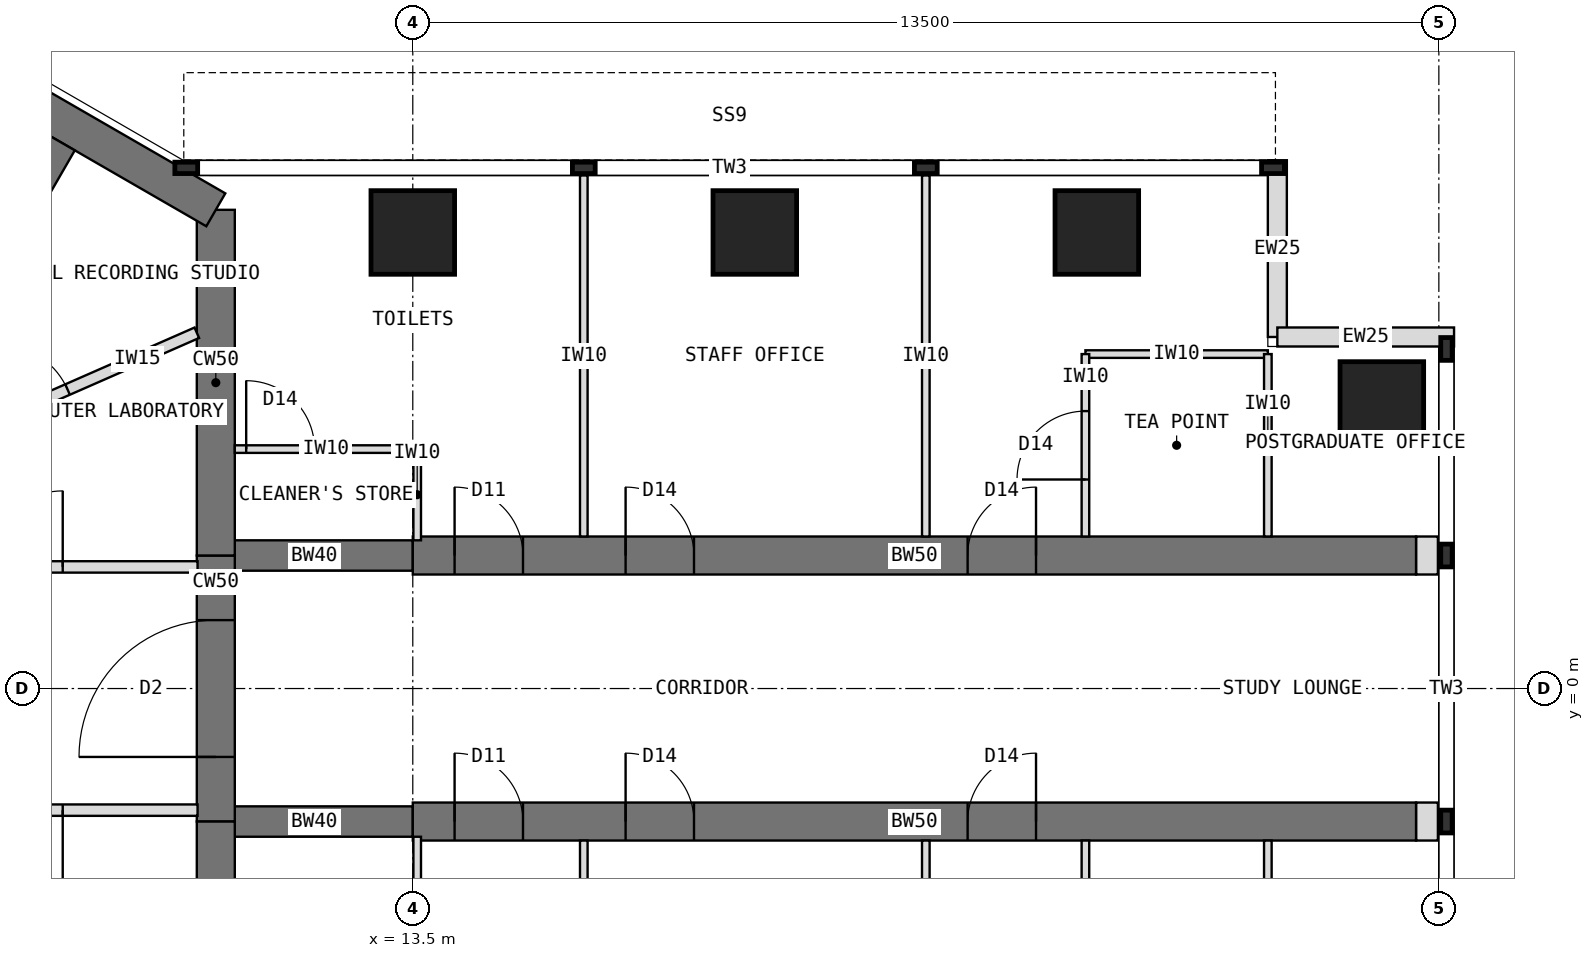
"""IFC4 building model, lengths in metres.
Left out: names, types, materials, properties, quantities, classifications, styles, units other than length and angle.
Written with IfcOpenShell. Run it as: python <this file> out.ifc"""

import sys

from ifc_helpers import new_model, si_unit, direction, frame, frame_2d, origin, origin_2d, place, context, subcontext, project, spatial, rectangle, extrude, element, fill, save


model = new_model("IFC4")
c1 = context("Model", 3, precision=1e-05, world=origin(), true_north=direction((0.0, 1.0)))
c2 = subcontext(c1, "Body", "Model", "MODEL_VIEW")
j1 = project(units=[si_unit("LENGTHUNIT", "METRE"), si_unit("PLANEANGLEUNIT", "RADIAN")], contexts=[c1])
p1 = place(None, origin())
s1 = spatial("IfcSite", under=j1, at=p1, CompositionType="ELEMENT")
p2 = place(p1, origin())
s2 = spatial("IfcBuilding", under=s1, at=p2, CompositionType="ELEMENT")
p3 = place(p2, frame((0.0, 0.0, 218.5)))
s3 = spatial("IfcBuildingStorey", under=s2, at=p3, CompositionType="ELEMENT", Elevation=218.5)
p4 = place(p3, frame((10.908, -6.298, 0.0), z_axis=(0.0, 0.0, 1.0), x_axis=(0.0, 1.0, 0.0)))
e1 = element("IfcWall", 1, at=p4, inside=s3, PredefinedType="SHEAR", context=c2, shape_type="SweptSolid", body=[
    extrude(rectangle(XDim=4.548, YDim=0.5, at=frame_2d((2.274, 0.0))), origin(), (0.0, 0.0, 1.0), 4.0),
])
p5 = place(p3, frame((10.908, -1.75, 0.0), z_axis=(0.0, 0.0, 1.0), x_axis=(0.0, 1.0, 0.0)))
e2 = element("IfcWall", 2, at=p5, inside=s3, PredefinedType="SHEAR", context=c2, shape_type="SweptSolid", body=[
    extrude(rectangle(XDim=3.5, YDim=0.5, at=frame_2d((1.75, 0.0))), origin(), (0.0, 0.0, 1.0), 4.0),
])
p6 = place(p5, frame((0.85, 0.0, 0.0)))
e3 = element("IfcOpeningElement", 3, at=p6, cuts=e2, PredefinedType="OPENING", context=c2, shape_type="SweptSolid", body=[
    extrude(rectangle(XDim=1.8, YDim=2.1, at=frame_2d((0.9, 1.05))), frame((0.0, 0.26, 0.0), z_axis=(0.0, -1.0, 0.0), x_axis=(1.0, 0.0, 0.0)), (0.0, 0.0, 1.0), 0.52),
])
p7 = place(p3, frame((10.908, 1.75, 0.0), z_axis=(0.0, 0.0, 1.0), x_axis=(0.0, 1.0, 0.0)))
e4 = element("IfcWall", 4, at=p7, inside=s3, PredefinedType="SHEAR", context=c2, shape_type="SweptSolid", body=[
    extrude(rectangle(XDim=4.548, YDim=0.5, at=frame_2d((2.274, 0.0))), origin(), (0.0, 0.0, 1.0), 4.0),
])
p8 = place(p3, frame((10.908, 6.298, 0.0), z_axis=(0.0, 0.0, 1.0), x_axis=(-0.866021940709, 0.500005998175, 0.0)))
e5 = element("IfcWall", 5, at=p8, inside=s3, PredefinedType="SHEAR", context=c2, shape_type="SweptSolid", body=[
    extrude(rectangle(XDim=12.596, YDim=0.5, at=frame_2d((6.298, 0.0))), origin(), (0.0, 0.0, 1.0), 4.0),
])
p9 = place(p3, frame((10.908, 1.75, 0.0), z_axis=(0.0, 0.0, 1.0), x_axis=(1.0, 0.0, 0.0)))
e6 = element("IfcWall", 6, at=p9, inside=s3, PredefinedType="SHEAR", context=c2, shape_type="SweptSolid", body=[
    extrude(rectangle(XDim=2.592, YDim=0.4, at=frame_2d((1.296, 0.0))), origin(), (0.0, 0.0, 1.0), 4.0),
])
p10 = place(p3, frame((13.5, 1.75, 0.0), z_axis=(0.0, 0.0, 1.0), x_axis=(1.0, 0.0, 0.0)))
e7 = element("IfcWall", 7, at=p10, inside=s3, PredefinedType="SHEAR", context=c2, shape_type="SweptSolid", body=[
    extrude(rectangle(XDim=13.2, YDim=0.5, at=frame_2d((6.6, 0.0))), origin(), (0.0, 0.0, 1.0), 4.0),
])
p11 = place(p10, frame((0.55, 0.0, 0.0)))
e8 = element("IfcOpeningElement", 8, at=p11, cuts=e7, PredefinedType="OPENING", context=c2, shape_type="SweptSolid", body=[
    extrude(rectangle(XDim=0.9, YDim=2.1, at=frame_2d((0.45, 1.05))), frame((0.0, 0.26, 0.0), z_axis=(0.0, -1.0, 0.0), x_axis=(1.0, 0.0, 0.0)), (0.0, 0.0, 1.0), 0.52),
])
p12 = place(p10, frame((2.8, 0.0, 0.0)))
e9 = element("IfcOpeningElement", 9, at=p12, cuts=e7, PredefinedType="OPENING", context=c2, shape_type="SweptSolid", body=[
    extrude(rectangle(XDim=0.9, YDim=2.1, at=frame_2d((0.45, 1.05))), frame((0.0, 0.26, 0.0), z_axis=(0.0, -1.0, 0.0), x_axis=(1.0, 0.0, 0.0)), (0.0, 0.0, 1.0), 0.52),
])
p13 = place(p10, frame((7.3, 0.0, 0.0)))
e10 = element("IfcOpeningElement", 10, at=p13, cuts=e7, PredefinedType="OPENING", context=c2, shape_type="SweptSolid", body=[
    extrude(rectangle(XDim=0.9, YDim=2.1, at=frame_2d((0.45, 1.05))), frame((0.0, 0.26, 0.0), z_axis=(0.0, -1.0, 0.0), x_axis=(1.0, 0.0, 0.0)), (0.0, 0.0, 1.0), 0.52),
])
p14 = place(p3, frame((10.908, -1.75, 0.0), z_axis=(0.0, 0.0, 1.0), x_axis=(1.0, 0.0, 0.0)))
e11 = element("IfcWall", 11, at=p14, inside=s3, PredefinedType="SHEAR", context=c2, shape_type="SweptSolid", body=[
    extrude(rectangle(XDim=2.592, YDim=0.4, at=frame_2d((1.296, 0.0))), origin(), (0.0, 0.0, 1.0), 4.0),
])
p15 = place(p3, frame((13.5, -1.75, 0.0), z_axis=(0.0, 0.0, 1.0), x_axis=(1.0, 0.0, 0.0)))
e12 = element("IfcWall", 12, at=p15, inside=s3, PredefinedType="SHEAR", context=c2, shape_type="SweptSolid", body=[
    extrude(rectangle(XDim=13.2, YDim=0.5, at=frame_2d((6.6, 0.0))), origin(), (0.0, 0.0, 1.0), 4.0),
])
p16 = place(p15, frame((0.55, 0.0, 0.0)))
e13 = element("IfcOpeningElement", 13, at=p16, cuts=e12, PredefinedType="OPENING", context=c2, shape_type="SweptSolid", body=[
    extrude(rectangle(XDim=0.9, YDim=2.1, at=frame_2d((0.45, 1.05))), frame((0.0, 0.26, 0.0), z_axis=(0.0, -1.0, 0.0), x_axis=(1.0, 0.0, 0.0)), (0.0, 0.0, 1.0), 0.52),
])
p17 = place(p15, frame((2.8, 0.0, 0.0)))
e14 = element("IfcOpeningElement", 14, at=p17, cuts=e12, PredefinedType="OPENING", context=c2, shape_type="SweptSolid", body=[
    extrude(rectangle(XDim=0.9, YDim=2.1, at=frame_2d((0.45, 1.05))), frame((0.0, 0.26, 0.0), z_axis=(0.0, -1.0, 0.0), x_axis=(1.0, 0.0, 0.0)), (0.0, 0.0, 1.0), 0.52),
])
p18 = place(p15, frame((7.3, 0.0, 0.0)))
e15 = element("IfcOpeningElement", 15, at=p18, cuts=e12, PredefinedType="OPENING", context=c2, shape_type="SweptSolid", body=[
    extrude(rectangle(XDim=0.9, YDim=2.1, at=frame_2d((0.45, 1.05))), frame((0.0, 0.26, 0.0), z_axis=(0.0, -1.0, 0.0), x_axis=(1.0, 0.0, 0.0)), (0.0, 0.0, 1.0), 0.52),
])
for number, where, z_axis, x_axis in (
    (16, (13.5, 6.0, 0.0), (0.0, 0.0, 1.0), (1.0, 0.0, 0.0)),
    (17, (18.0, 6.0, 0.0), (0.0, 0.0, 1.0), (1.0, 0.0, 0.0)),
    (18, (22.5, 6.0, 0.0), (0.0, 0.0, 1.0), (1.0, 0.0, 0.0)),
    (19, (26.25, 3.75, 0.0), (0.0, 0.0, 1.0), (1.0, 0.0, 0.0)),
):
    element("IfcColumn", number, at=place(p3, frame(where, z_axis=z_axis, x_axis=x_axis)), inside=s3, PredefinedType="COLUMN", context=c2, shape_type="SweptSolid", body=[
        extrude(rectangle(XDim=1.1, YDim=1.1, at=origin_2d()), origin(), (0.0, 0.0, 1.0), 4.0),
    ])
for number, where, z_axis, x_axis in (
    (20, (24.875, 6.95, 0.0), (0.0, 0.0, 1.0), (0.0, -1.0, 0.0)),
    (21, (24.875, 4.625, 0.0), (0.0, 0.0, 1.0), (1.0, 0.0, 0.0)),
):
    element("IfcWall", number, at=place(p3, frame(where, z_axis=z_axis, x_axis=x_axis)), inside=s3, PredefinedType="STANDARD", context=c2, shape_type="SweptSolid", body=[
        extrude(rectangle(XDim=2.325, YDim=0.25, at=frame_2d((1.163, 0.0))), origin(), (0.0, 0.0, 1.0), 3.8),
    ])
for number, where, z_axis, x_axis in (
    (22, (26.7, 1.75, 0.0), (0.0, 0.0, 1.0), (1.0, 0.0, 0.0)),
    (23, (26.7, -1.75, 0.0), (0.0, 0.0, 1.0), (1.0, 0.0, 0.0)),
):
    element("IfcWall", number, at=place(p3, frame(where, z_axis=z_axis, x_axis=x_axis)), inside=s3, PredefinedType="PARTITIONING", context=c2, shape_type="SweptSolid", body=[
        extrude(rectangle(XDim=0.288, YDim=0.5, at=frame_2d((0.144, 0.0))), origin(), (0.0, 0.0, 1.0), 3.8),
    ])
for number, where, z_axis, x_axis in (
    (24, (5.901, 2.02, 0.0), (0.0, 0.0, 1.0), (0.5, 0.866, 0.0)),
    (25, (5.901, -2.02, 0.0), (0.0, 0.0, 1.0), (0.5, -0.866, 0.0)),
):
    element("IfcWall", number, at=place(p3, frame(where, z_axis=z_axis, x_axis=x_axis)), inside=s3, PredefinedType="SHEAR", context=c2, shape_type="SweptSolid", body=[
        extrude(rectangle(XDim=5.958, YDim=0.4, at=frame_2d((2.979, 0.0))), origin(), (0.0, 0.0, 1.0), 4.0),
    ])
for number, where, z_axis, x_axis in (
    (26, (15.75, 2.0, 0.0), (0.0, 0.0, 1.0), (0.0, 1.0, 0.0)),
    (27, (20.25, 2.0, 0.0), (0.0, 0.0, 1.0), (0.0, 1.0, 0.0)),
):
    element("IfcWall", number, at=place(p3, frame(where, z_axis=z_axis, x_axis=x_axis)), inside=s3, PredefinedType="PARTITIONING", context=c2, shape_type="SweptSolid", body=[
        extrude(rectangle(XDim=4.75, YDim=0.1, at=frame_2d((2.375, 0.0))), origin(), (0.0, 0.0, 1.0), 3.8),
    ])
p19 = place(p3, frame((22.35, 4.4, 0.0), z_axis=(0.0, 0.0, 1.0), x_axis=(1.0, 0.0, 0.0)))
e28 = element("IfcWall", 28, at=p19, inside=s3, PredefinedType="PARTITIONING", context=c2, shape_type="SweptSolid", body=[
    extrude(rectangle(XDim=2.4, YDim=0.1, at=frame_2d((1.2, 0.0))), origin(), (0.0, 0.0, 1.0), 3.8),
])
p20 = place(p3, frame((22.35, 2.0, 0.0), z_axis=(0.0, 0.0, 1.0), x_axis=(0.0, 1.0, 0.0)))
e29 = element("IfcWall", 29, at=p20, inside=s3, PredefinedType="PARTITIONING", context=c2, shape_type="SweptSolid", body=[
    extrude(rectangle(XDim=2.4, YDim=0.1, at=frame_2d((1.2, 0.0))), origin(), (0.0, 0.0, 1.0), 3.8),
])
p21 = place(p20, frame((0.75, 0.0, 0.0)))
e30 = element("IfcOpeningElement", 30, at=p21, cuts=e29, PredefinedType="OPENING", context=c2, shape_type="SweptSolid", body=[
    extrude(rectangle(XDim=0.9, YDim=2.1, at=frame_2d((0.45, 1.05))), frame((0.0, 0.06, 0.0), z_axis=(0.0, -1.0, 0.0), x_axis=(1.0, 0.0, 0.0)), (0.0, 0.0, 1.0), 0.12),
])
p22 = place(p3, frame((24.75, 2.0, 0.0), z_axis=(0.0, 0.0, 1.0), x_axis=(0.0, 1.0, 0.0)))
e31 = element("IfcWall", 31, at=p22, inside=s3, PredefinedType="PARTITIONING", context=c2, shape_type="SweptSolid", body=[
    extrude(rectangle(XDim=2.4, YDim=0.1, at=frame_2d((1.2, 0.0))), origin(), (0.0, 0.0, 1.0), 3.8),
])
p23 = place(p3, frame((11.158, 3.15, 0.0), z_axis=(0.0, 0.0, 1.0), x_axis=(1.0, 0.0, 0.0)))
e32 = element("IfcWall", 32, at=p23, inside=s3, PredefinedType="PARTITIONING", context=c2, shape_type="SweptSolid", body=[
    extrude(rectangle(XDim=2.4, YDim=0.1, at=frame_2d((1.2, 0.0))), origin(), (0.0, 0.0, 1.0), 3.8),
])
p24 = place(p23, frame((0.15, 0.0, 0.0)))
e33 = element("IfcOpeningElement", 33, at=p24, cuts=e32, PredefinedType="OPENING", context=c2, shape_type="SweptSolid", body=[
    extrude(rectangle(XDim=0.9, YDim=2.1, at=frame_2d((0.45, 1.05))), frame((0.0, 0.06, 0.0), z_axis=(0.0, -1.0, 0.0), x_axis=(1.0, 0.0, 0.0)), (0.0, 0.0, 1.0), 0.12),
])
p25 = place(p3, frame((13.558, 1.95, 0.0), z_axis=(0.0, 0.0, 1.0), x_axis=(0.0, 1.0, 0.0)))
e34 = element("IfcWall", 34, at=p25, inside=s3, PredefinedType="PARTITIONING", context=c2, shape_type="SweptSolid", body=[
    extrude(rectangle(XDim=1.2, YDim=0.1, at=frame_2d((0.6, 0.0))), origin(), (0.0, 0.0, 1.0), 3.267),
])
for number, where, z_axis, x_axis in (
    (35, (15.75, -2.0, 0.0), (0.0, 0.0, 1.0), (0.0, -1.0, 0.0)),
    (36, (20.25, -2.0, 0.0), (0.0, 0.0, 1.0), (0.0, -1.0, 0.0)),
):
    element("IfcWall", number, at=place(p3, frame(where, z_axis=z_axis, x_axis=x_axis)), inside=s3, PredefinedType="PARTITIONING", context=c2, shape_type="SweptSolid", body=[
        extrude(rectangle(XDim=4.75, YDim=0.1, at=frame_2d((2.375, 0.0))), origin(), (0.0, 0.0, 1.0), 3.8),
    ])
p26 = place(p3, frame((22.35, -2.0, 0.0), z_axis=(0.0, 0.0, 1.0), x_axis=(0.0, -1.0, 0.0)))
e37 = element("IfcWall", 37, at=p26, inside=s3, PredefinedType="PARTITIONING", context=c2, shape_type="SweptSolid", body=[
    extrude(rectangle(XDim=2.4, YDim=0.1, at=frame_2d((1.2, 0.0))), origin(), (0.0, 0.0, 1.0), 3.8),
])
p27 = place(p26, frame((0.75, 0.0, 0.0)))
e38 = element("IfcOpeningElement", 38, at=p27, cuts=e37, PredefinedType="OPENING", context=c2, shape_type="SweptSolid", body=[
    extrude(rectangle(XDim=0.9, YDim=2.1, at=frame_2d((0.45, 1.05))), frame((0.0, 0.06, 0.0), z_axis=(0.0, -1.0, 0.0), x_axis=(1.0, 0.0, 0.0)), (0.0, 0.0, 1.0), 0.12),
])
p28 = place(p3, frame((24.75, -2.0, 0.0), z_axis=(0.0, 0.0, 1.0), x_axis=(0.0, -1.0, 0.0)))
e39 = element("IfcWall", 39, at=p28, inside=s3, PredefinedType="PARTITIONING", context=c2, shape_type="SweptSolid", body=[
    extrude(rectangle(XDim=2.4, YDim=0.1, at=frame_2d((1.2, 0.0))), origin(), (0.0, 0.0, 1.0), 3.8),
])
p29 = place(p3, frame((13.558, -1.95, 0.0), z_axis=(0.0, 0.0, 1.0), x_axis=(0.0, -1.0, 0.0)))
e40 = element("IfcWall", 40, at=p29, inside=s3, PredefinedType="PARTITIONING", context=c2, shape_type="SweptSolid", body=[
    extrude(rectangle(XDim=3.2, YDim=0.1, at=frame_2d((1.6, 0.0))), origin(), (0.0, 0.0, 1.0), 3.267),
])
p30 = place(p3, frame((6.1, 1.6, 0.0), z_axis=(0.0, 0.0, 1.0), x_axis=(1.0, 0.0, 0.0)))
e41 = element("IfcWall", 41, at=p30, inside=s3, PredefinedType="PARTITIONING", context=c2, shape_type="SweptSolid", body=[
    extrude(rectangle(XDim=4.568, YDim=0.15, at=frame_2d((2.284, 0.0))), origin(), (0.0, 0.0, 1.0), 3.8),
])
p31 = place(p30, frame((1.794, 0.0, 0.0)))
e42 = element("IfcOpeningElement", 42, at=p31, cuts=e41, PredefinedType="OPENING", context=c2, shape_type="SweptSolid", body=[
    extrude(rectangle(XDim=1.0, YDim=2.1, at=frame_2d((0.5, 1.05))), frame((0.0, 0.085, 0.0), z_axis=(0.0, -1.0, 0.0), x_axis=(1.0, 0.0, 0.0)), (0.0, 0.0, 1.0), 0.17),
])
p32 = place(p3, frame((10.668, -1.6, 0.0), z_axis=(0.0, 0.0, 1.0), x_axis=(-1.0, 0.0, 0.0)))
e43 = element("IfcWall", 43, at=p32, inside=s3, PredefinedType="PARTITIONING", context=c2, shape_type="SweptSolid", body=[
    extrude(rectangle(XDim=4.568, YDim=0.15, at=frame_2d((2.284, 0.0))), origin(), (0.0, 0.0, 1.0), 3.8),
])
p33 = place(p32, frame((1.774, 0.0, 0.0)))
e44 = element("IfcOpeningElement", 44, at=p33, cuts=e43, PredefinedType="OPENING", context=c2, shape_type="SweptSolid", body=[
    extrude(rectangle(XDim=1.0, YDim=2.1, at=frame_2d((0.5, 1.05))), frame((0.0, 0.085, 0.0), z_axis=(0.0, -1.0, 0.0), x_axis=(1.0, 0.0, 0.0)), (0.0, 0.0, 1.0), 0.17),
])
p34 = place(p3, frame((6.342, 2.785, 0.0), z_axis=(0.0, 0.0, 1.0), x_axis=(0.915607292951, 0.402073730919, 0.0)))
e45 = element("IfcWall", 45, at=p34, inside=s3, PredefinedType="PARTITIONING", context=c2, shape_type="SweptSolid", body=[
    extrude(rectangle(XDim=4.714, YDim=0.15, at=frame_2d((2.357, 0.0))), origin(), (0.0, 0.0, 1.0), 3.8),
])
p35 = place(p34, frame((1.857, 0.0, 0.0)))
e46 = element("IfcOpeningElement", 46, at=p35, cuts=e45, PredefinedType="OPENING", context=c2, shape_type="SweptSolid", body=[
    extrude(rectangle(XDim=1.0, YDim=2.1, at=frame_2d((0.5, 1.05))), frame((0.0, 0.085, 0.0), z_axis=(0.0, -1.0, 0.0), x_axis=(1.0, 0.0, 0.0)), (0.0, 0.0, 1.0), 0.17),
])
p36 = place(p6, origin())
e47 = element("IfcDoor", 47, at=p36, inside=s3, OperationType="DOUBLE_DOOR_DOUBLE_SWING", PredefinedType="DOOR", context=c2, shape_type="SweptSolid", body=[
    extrude(rectangle(XDim=1.8, YDim=2.1, at=frame_2d((0.9, 1.05))), frame((0.0, 0.025, 0.0), z_axis=(0.0, -1.0, 0.0), x_axis=(1.0, 0.0, 0.0)), (0.0, 0.0, 1.0), 0.05),
])
fill(e3, e47)
p37 = place(p21, origin())
e48 = element("IfcDoor", 48, at=p37, inside=s3, OperationType="SINGLE_SWING_LEFT", PredefinedType="DOOR", context=c2, shape_type="SweptSolid", body=[
    extrude(rectangle(XDim=0.9, YDim=2.1, at=frame_2d((0.45, 1.05))), frame((0.0, 0.025, 0.0), z_axis=(0.0, -1.0, 0.0), x_axis=(1.0, 0.0, 0.0)), (0.0, 0.0, 1.0), 0.05),
])
fill(e30, e48)
p38 = place(p24, origin())
e49 = element("IfcDoor", 49, at=p38, inside=s3, OperationType="SINGLE_SWING_LEFT", PredefinedType="DOOR", context=c2, shape_type="SweptSolid", body=[
    extrude(rectangle(XDim=0.9, YDim=2.1, at=frame_2d((0.45, 1.05))), frame((0.0, 0.025, 0.0), z_axis=(0.0, -1.0, 0.0), x_axis=(1.0, 0.0, 0.0)), (0.0, 0.0, 1.0), 0.05),
])
fill(e33, e49)
p39 = place(p33, origin())
e50 = element("IfcDoor", 50, at=p39, inside=s3, OperationType="SINGLE_SWING_LEFT", PredefinedType="DOOR", context=c2, shape_type="SweptSolid", body=[
    extrude(rectangle(XDim=1.0, YDim=2.1, at=frame_2d((0.5, 1.05))), frame((0.0, 0.025, 0.0), z_axis=(0.0, -1.0, 0.0), x_axis=(1.0, 0.0, 0.0)), (0.0, 0.0, 1.0), 0.05),
])
fill(e44, e50)
p40 = place(p31, origin())
e51 = element("IfcDoor", 51, at=p40, inside=s3, OperationType="SINGLE_SWING_RIGHT", PredefinedType="DOOR", context=c2, shape_type="SweptSolid", body=[
    extrude(rectangle(XDim=1.0, YDim=2.1, at=frame_2d((0.5, 1.05))), frame((0.0, 0.025, 0.0), z_axis=(0.0, -1.0, 0.0), x_axis=(1.0, 0.0, 0.0)), (0.0, 0.0, 1.0), 0.05),
])
fill(e42, e51)
p41 = place(p35, origin())
e52 = element("IfcDoor", 52, at=p41, inside=s3, OperationType="SINGLE_SWING_LEFT", PredefinedType="DOOR", context=c2, shape_type="SweptSolid", body=[
    extrude(rectangle(XDim=1.0, YDim=2.1, at=frame_2d((0.5, 1.05))), frame((0.0, 0.025, 0.0), z_axis=(0.0, -1.0, 0.0), x_axis=(1.0, 0.0, 0.0)), (0.0, 0.0, 1.0), 0.05),
])
fill(e46, e52)
p42 = place(p11, origin())
e53 = element("IfcDoor", 53, at=p42, inside=s3, OperationType="SINGLE_SWING_LEFT", PredefinedType="DOOR", context=c2, shape_type="SweptSolid", body=[
    extrude(rectangle(XDim=0.9, YDim=2.1, at=frame_2d((0.45, 1.05))), frame((0.0, 0.025, 0.0), z_axis=(0.0, -1.0, 0.0), x_axis=(1.0, 0.0, 0.0)), (0.0, 0.0, 1.0), 0.05),
])
fill(e8, e53)
p43 = place(p12, origin())
e54 = element("IfcDoor", 54, at=p43, inside=s3, OperationType="SINGLE_SWING_LEFT", PredefinedType="DOOR", context=c2, shape_type="SweptSolid", body=[
    extrude(rectangle(XDim=0.9, YDim=2.1, at=frame_2d((0.45, 1.05))), frame((0.0, 0.025, 0.0), z_axis=(0.0, -1.0, 0.0), x_axis=(1.0, 0.0, 0.0)), (0.0, 0.0, 1.0), 0.05),
])
fill(e9, e54)
p44 = place(p13, origin())
e55 = element("IfcDoor", 55, at=p44, inside=s3, OperationType="SINGLE_SWING_RIGHT", PredefinedType="DOOR", context=c2, shape_type="SweptSolid", body=[
    extrude(rectangle(XDim=0.9, YDim=2.1, at=frame_2d((0.45, 1.05))), frame((0.0, 0.025, 0.0), z_axis=(0.0, -1.0, 0.0), x_axis=(1.0, 0.0, 0.0)), (0.0, 0.0, 1.0), 0.05),
])
fill(e10, e55)
p45 = place(p16, origin())
e56 = element("IfcDoor", 56, at=p45, inside=s3, OperationType="SINGLE_SWING_LEFT", PredefinedType="DOOR", context=c2, shape_type="SweptSolid", body=[
    extrude(rectangle(XDim=0.9, YDim=2.1, at=frame_2d((0.45, 1.05))), frame((0.0, 0.025, 0.0), z_axis=(0.0, -1.0, 0.0), x_axis=(1.0, 0.0, 0.0)), (0.0, 0.0, 1.0), 0.05),
])
fill(e13, e56)
p46 = place(p17, origin())
e57 = element("IfcDoor", 57, at=p46, inside=s3, OperationType="SINGLE_SWING_LEFT", PredefinedType="DOOR", context=c2, shape_type="SweptSolid", body=[
    extrude(rectangle(XDim=0.9, YDim=2.1, at=frame_2d((0.45, 1.05))), frame((0.0, 0.025, 0.0), z_axis=(0.0, -1.0, 0.0), x_axis=(1.0, 0.0, 0.0)), (0.0, 0.0, 1.0), 0.05),
])
fill(e14, e57)
p47 = place(p18, origin())
e58 = element("IfcDoor", 58, at=p47, inside=s3, OperationType="SINGLE_SWING_RIGHT", PredefinedType="DOOR", context=c2, shape_type="SweptSolid", body=[
    extrude(rectangle(XDim=0.9, YDim=2.1, at=frame_2d((0.45, 1.05))), frame((0.0, 0.025, 0.0), z_axis=(0.0, -1.0, 0.0), x_axis=(1.0, 0.0, 0.0)), (0.0, 0.0, 1.0), 0.05),
])
fill(e15, e58)
save(model, sys.argv[1])
